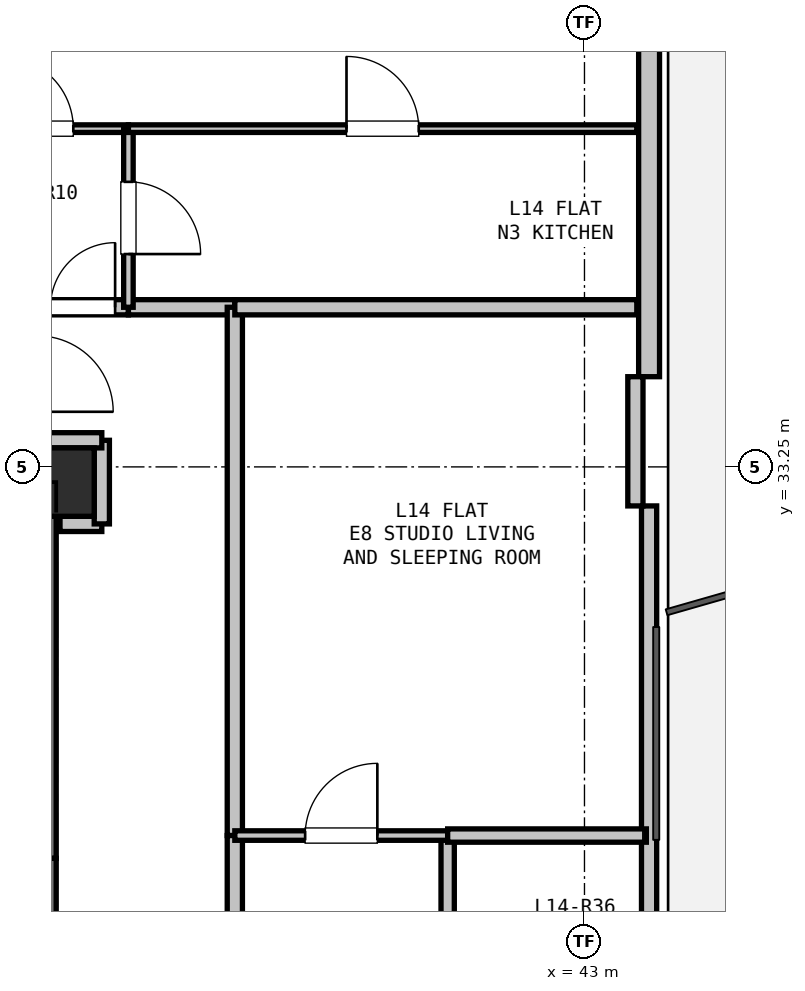
"""IFC4 building model, lengths in metres.
Left out: names, types, materials, properties, quantities, classifications, styles, units other than length and angle.
Written with IfcOpenShell. Run it as: python <this file> out.ifc"""

import sys

from ifc_helpers import new_model, si_unit, direction, frame, frame_2d, origin, origin_2d, place, context, subcontext, project, spatial, rectangle, extrude, element, fill, save


model = new_model("IFC4")
c1 = context("Model", 3, precision=1e-05, world=origin(), true_north=direction((0.0, 1.0)))
c2 = subcontext(c1, "Body", "Model", "MODEL_VIEW")
j1 = project(units=[si_unit("LENGTHUNIT", "METRE"), si_unit("PLANEANGLEUNIT", "RADIAN")], contexts=[c1])
p1 = place(None, origin())
s1 = spatial("IfcSite", under=j1, at=p1, CompositionType="ELEMENT")
p2 = place(p1, origin())
s2 = spatial("IfcBuilding", under=s1, at=p2, CompositionType="ELEMENT")
p3 = place(p2, frame((0.0, 0.0, 52.2)))
s3 = spatial("IfcBuildingStorey", under=s2, at=p3, CompositionType="ELEMENT", Elevation=52.2)
p4 = place(p3, frame((36.1, 33.05, 0.0), z_axis=(0.0, 0.0, 1.0), x_axis=(1.0, 0.0, 0.0)))
e1 = element("IfcColumn", 1, at=p4, inside=s3, PredefinedType="COLUMN", context=c2, shape_type="SweptSolid", body=[
    extrude(rectangle(XDim=0.9, YDim=0.9, at=origin_2d()), origin(), (0.0, 0.0, 1.0), 3.3),
])
p5 = place(p3, frame((43.85, 47.11, 0.0), z_axis=(0.0, 0.0, 1.0), x_axis=(0.0, -1.0, 0.0)))
e2 = element("IfcWall", 2, at=p5, inside=s3, PredefinedType="SOLIDWALL", context=c2, shape_type="SweptSolid", body=[
    extrude(rectangle(XDim=12.673, YDim=0.275, at=frame_2d((6.336, 0.0))), origin(), (0.0, 0.0, 1.0), 2.66),
])
p6 = place(p5, frame((2.325, 0.0, 0.0)))
e3 = element("IfcOpeningElement", 3, at=p6, cuts=e2, PredefinedType="OPENING", context=c2, shape_type="SweptSolid", body=[
    extrude(rectangle(XDim=1.0, YDim=2.1, at=frame_2d((0.5, 1.05))), frame((0.0, 0.147, 0.0), z_axis=(0.0, -1.0, 0.0), x_axis=(1.0, 0.0, 0.0)), (0.0, 0.0, 1.0), 0.295),
])
p7 = place(p3, frame((43.85, 32.737, 0.0), z_axis=(0.0, 0.0, 1.0), x_axis=(0.0, -1.0, 0.0)))
e4 = element("IfcWall", 4, at=p7, inside=s3, PredefinedType="PARAPET", context=c2, shape_type="SweptSolid", body=[
    extrude(rectangle(XDim=11.973, YDim=0.2, at=frame_2d((5.987, 0.0))), origin(), (0.0, 0.0, 1.0), 0.2),
])
p8 = place(p3, frame((43.67, 34.437, 0.0), z_axis=(0.0, 0.0, 1.0), x_axis=(0.0, -1.0, 0.0)))
e5 = element("IfcWall", 5, at=p8, inside=s3, PredefinedType="PARAPET", context=c2, shape_type="SweptSolid", body=[
    extrude(rectangle(XDim=1.7, YDim=0.2, at=frame_2d((0.85, 0.0))), origin(), (0.0, 0.0, 1.0), 2.66),
])
p9 = place(p3, frame((35.8, 32.75, 0.0), z_axis=(0.0, 0.0, 1.0), x_axis=(0.0, -1.0, 0.0)))
e6 = element("IfcWall", 6, at=p9, inside=s3, PredefinedType="SHEAR", context=c2, shape_type="SweptSolid", body=[
    extrude(rectangle(XDim=4.65, YDim=0.5, at=frame_2d((2.325, 0.0))), origin(), (0.0, 0.0, 1.0), 3.04),
])
p10 = place(p3, frame((35.8, 28.1, 0.0), z_axis=(0.0, 0.0, 1.0), x_axis=(0.0, -1.0, 0.0)))
e7 = element("IfcWall", 7, at=p10, inside=s3, PredefinedType="SHEAR", context=c2, shape_type="SweptSolid", body=[
    extrude(rectangle(XDim=7.35, YDim=0.5, at=frame_2d((3.675, 0.0))), origin(), (0.0, 0.0, 1.0), 3.04),
])
p11 = place(p3, frame((36.1, 32.5, 0.0), z_axis=(0.0, 0.0, 1.0), x_axis=(1.0, 0.0, 0.0)))
e8 = element("IfcWall", 8, at=p11, inside=s3, PredefinedType="PARTITIONING", context=c2, shape_type="SweptSolid", body=[
    extrude(rectangle(XDim=0.55, YDim=0.2, at=frame_2d((0.275, 0.0))), origin(), (0.0, 0.0, 1.0), 2.488),
])
p12 = place(p3, frame((36.65, 32.5, 0.0), z_axis=(0.0, 0.0, 1.0), x_axis=(0.0, 1.0, 0.0)))
e9 = element("IfcWall", 9, at=p12, inside=s3, PredefinedType="PARTITIONING", context=c2, shape_type="SweptSolid", body=[
    extrude(rectangle(XDim=1.1, YDim=0.2, at=frame_2d((0.55, 0.0))), origin(), (0.0, 0.0, 1.0), 2.338),
])
p13 = place(p3, frame((36.65, 33.6, 0.0), z_axis=(0.0, 0.0, 1.0), x_axis=(-1.0, 0.0, 0.0)))
e10 = element("IfcWall", 10, at=p13, inside=s3, PredefinedType="PARTITIONING", context=c2, shape_type="SweptSolid", body=[
    extrude(rectangle(XDim=0.85, YDim=0.2, at=frame_2d((0.425, 0.0))), origin(), (0.0, 0.0, 1.0), 2.338),
])
p14 = place(p3, frame((35.8, 35.35, 0.0), z_axis=(0.0, 0.0, 1.0), x_axis=(1.0, 0.0, 0.0)))
e11 = element("IfcWall", 11, at=p14, inside=s3, PredefinedType="PARTITIONING", context=c2, shape_type="SweptSolid", body=[
    extrude(rectangle(XDim=1.2, YDim=0.2, at=frame_2d((0.6, 0.0))), origin(), (0.0, 0.0, 1.0), 2.338),
])
p15 = place(p14, frame((0.175, 0.0, 0.0)))
e12 = element("IfcOpeningElement", 12, at=p15, cuts=e11, PredefinedType="OPENING", context=c2, shape_type="SweptSolid", body=[
    extrude(rectangle(XDim=0.85, YDim=2.1, at=frame_2d((0.425, 1.05))), frame((0.0, 0.11, 0.0), z_axis=(0.0, -1.0, 0.0), x_axis=(1.0, 0.0, 0.0)), (0.0, 0.0, 1.0), 0.22),
])
p16 = place(p3, frame((37.0, 35.35, 0.0), z_axis=(0.0, 0.0, 1.0), x_axis=(1.0, 0.0, 0.0)))
e13 = element("IfcWall", 13, at=p16, inside=s3, PredefinedType="PARTITIONING", context=c2, shape_type="SweptSolid", body=[
    extrude(rectangle(XDim=1.4, YDim=0.2, at=frame_2d((0.7, 0.0))), origin(), (0.0, 0.0, 1.0), 2.338),
])
p17 = place(p3, frame((38.4, 35.35, 0.0), z_axis=(0.0, 0.0, 1.0), x_axis=(0.0, -1.0, 0.0)))
e14 = element("IfcWall", 14, at=p17, inside=s3, PredefinedType="PARTITIONING", context=c2, shape_type="SweptSolid", body=[
    extrude(rectangle(XDim=6.95, YDim=0.2, at=frame_2d((3.475, 0.0))), origin(), (0.0, 0.0, 1.0), 2.338),
])
p18 = place(p3, frame((38.4, 28.4, 0.0), z_axis=(0.0, 0.0, 1.0), x_axis=(0.0, -1.0, 0.0)))
e15 = element("IfcWall", 15, at=p18, inside=s3, PredefinedType="PARTITIONING", context=c2, shape_type="SweptSolid", body=[
    extrude(rectangle(XDim=3.2, YDim=0.2, at=frame_2d((1.6, 0.0))), origin(), (0.0, 0.0, 1.0), 3.04),
])
p19 = place(p18, frame((1.1, 0.0, 0.0)))
e16 = element("IfcOpeningElement", 16, at=p19, cuts=e15, PredefinedType="OPENING", context=c2, shape_type="SweptSolid", body=[
    extrude(rectangle(XDim=1.0, YDim=2.15, at=frame_2d((0.5, 1.075))), frame((0.0, 0.11, 0.0), z_axis=(0.0, -1.0, 0.0), x_axis=(1.0, 0.0, 0.0)), (0.0, 0.0, 1.0), 0.22),
])
p20 = place(p3, frame((34.6, 37.7, 0.0), z_axis=(0.0, 0.0, 1.0), x_axis=(1.0, 0.0, 0.0)))
e17 = element("IfcWall", 17, at=p20, inside=s3, PredefinedType="PARTITIONING", context=c2, shape_type="SweptSolid", body=[
    extrude(rectangle(XDim=2.4, YDim=0.1, at=frame_2d((1.2, 0.0))), origin(), (0.0, 0.0, 1.0), 2.338),
])
p21 = place(p20, frame((0.725, 0.0, 0.0)))
e18 = element("IfcOpeningElement", 18, at=p21, cuts=e17, PredefinedType="OPENING", context=c2, shape_type="SweptSolid", body=[
    extrude(rectangle(XDim=0.95, YDim=2.1, at=frame_2d((0.475, 1.05))), frame((0.0, 0.06, 0.0), z_axis=(0.0, -1.0, 0.0), x_axis=(1.0, 0.0, 0.0)), (0.0, 0.0, 1.0), 0.12),
])
p22 = place(p3, frame((37.0, 37.7, 0.0), z_axis=(0.0, 0.0, 1.0), x_axis=(0.0, -1.0, 0.0)))
e19 = element("IfcWall", 19, at=p22, inside=s3, PredefinedType="PARTITIONING", context=c2, shape_type="SweptSolid", body=[
    extrude(rectangle(XDim=2.35, YDim=0.125, at=frame_2d((1.175, 0.0))), origin(), (0.0, 0.0, 1.0), 2.338),
])
p23 = place(p22, frame((0.7, 0.0, 0.0)))
e20 = element("IfcOpeningElement", 20, at=p23, cuts=e19, PredefinedType="OPENING", context=c2, shape_type="SweptSolid", body=[
    extrude(rectangle(XDim=0.95, YDim=2.1, at=frame_2d((0.475, 1.05))), frame((0.0, 0.073, 0.0), z_axis=(0.0, -1.0, 0.0), x_axis=(1.0, 0.0, 0.0)), (0.0, 0.0, 1.0), 0.145),
])
p24 = place(p3, frame((41.2, 28.4, 0.0), z_axis=(0.0, 0.0, 1.0), x_axis=(0.0, -1.0, 0.0)))
e21 = element("IfcWall", 21, at=p24, inside=s3, PredefinedType="PLUMBINGWALL", context=c2, shape_type="SweptSolid", body=[
    extrude(rectangle(XDim=3.2, YDim=0.175, at=frame_2d((1.6, 0.0))), origin(), (0.0, 0.0, 1.0), 3.04),
])
p25 = place(p24, frame((1.15, 0.0, 0.0)))
e22 = element("IfcOpeningElement", 22, at=p25, cuts=e21, PredefinedType="OPENING", context=c2, shape_type="SweptSolid", body=[
    extrude(rectangle(XDim=0.9, YDim=2.1, at=frame_2d((0.45, 1.05))), frame((0.0, 0.097, 0.0), z_axis=(0.0, -1.0, 0.0), x_axis=(1.0, 0.0, 0.0)), (0.0, 0.0, 1.0), 0.195),
])
p26 = place(p3, frame((38.4, 28.4, 0.0), z_axis=(0.0, 0.0, 1.0), x_axis=(1.0, 0.0, 0.0)))
e23 = element("IfcWall", 23, at=p26, inside=s3, PredefinedType="PARTITIONING", context=c2, shape_type="SweptSolid", body=[
    extrude(rectangle(XDim=2.8, YDim=0.125, at=frame_2d((1.4, 0.0))), origin(), (0.0, 0.0, 1.0), 3.04),
])
p27 = place(p26, frame((0.925, 0.0, 0.0)))
e24 = element("IfcOpeningElement", 24, at=p27, cuts=e23, PredefinedType="OPENING", context=c2, shape_type="SweptSolid", body=[
    extrude(rectangle(XDim=0.95, YDim=2.1, at=frame_2d((0.475, 1.05))), frame((0.0, 0.073, 0.0), z_axis=(0.0, -1.0, 0.0), x_axis=(1.0, 0.0, 0.0)), (0.0, 0.0, 1.0), 0.145),
])
p28 = place(p3, frame((43.688, 35.35, 0.0), z_axis=(0.0, 0.0, 1.0), x_axis=(-1.0, 0.0, 0.0)))
e25 = element("IfcWall", 25, at=p28, inside=s3, PredefinedType="PARTITIONING", context=c2, shape_type="SweptSolid", body=[
    extrude(rectangle(XDim=5.289, YDim=0.2, at=frame_2d((2.644, 0.0))), origin(), (0.0, 0.0, 1.0), 2.338),
])
p29 = place(p3, frame((37.0, 37.7, 0.0), z_axis=(0.0, 0.0, 1.0), x_axis=(1.0, 0.0, 0.0)))
e26 = element("IfcWall", 26, at=p29, inside=s3, PredefinedType="PARTITIONING", context=c2, shape_type="SweptSolid", body=[
    extrude(rectangle(XDim=6.688, YDim=0.1, at=frame_2d((3.344, 0.0))), origin(), (0.0, 0.0, 1.0), 2.338),
])
p30 = place(p29, frame((2.869, 0.0, 0.0)))
e27 = element("IfcOpeningElement", 27, at=p30, cuts=e26, PredefinedType="OPENING", context=c2, shape_type="SweptSolid", body=[
    extrude(rectangle(XDim=0.95, YDim=2.1, at=frame_2d((0.475, 1.05))), frame((0.0, 0.06, 0.0), z_axis=(0.0, -1.0, 0.0), x_axis=(1.0, 0.0, 0.0)), (0.0, 0.0, 1.0), 0.12),
])
p31 = place(p3, frame((41.2, 28.4, 0.0), z_axis=(0.0, 0.0, 1.0), x_axis=(1.0, 0.0, 0.0)))
e28 = element("IfcWall", 28, at=p31, inside=s3, PredefinedType="PLUMBINGWALL", context=c2, shape_type="SweptSolid", body=[
    extrude(rectangle(XDim=2.614, YDim=0.175, at=frame_2d((1.307, 0.0))), origin(), (0.0, 0.0, 1.0), 2.365),
])
p32 = place(p15, origin())
e29 = element("IfcDoor", 29, at=p32, inside=s3, OperationType="SINGLE_SWING_RIGHT", PredefinedType="DOOR", context=c2, shape_type="SweptSolid", body=[
    extrude(rectangle(XDim=0.85, YDim=2.1, at=frame_2d((0.425, 1.05))), frame((0.0, 0.025, 0.0), z_axis=(0.0, -1.0, 0.0), x_axis=(1.0, 0.0, 0.0)), (0.0, 0.0, 1.0), 0.05),
])
fill(e12, e29)
p33 = place(p23, origin())
e30 = element("IfcDoor", 30, at=p33, inside=s3, OperationType="SINGLE_SWING_RIGHT", PredefinedType="DOOR", context=c2, shape_type="SweptSolid", body=[
    extrude(rectangle(XDim=0.95, YDim=2.1, at=frame_2d((0.475, 1.05))), frame((0.0, 0.025, 0.0), z_axis=(0.0, -1.0, 0.0), x_axis=(1.0, 0.0, 0.0)), (0.0, 0.0, 1.0), 0.05),
])
fill(e20, e30)
p34 = place(p21, origin())
e31 = element("IfcDoor", 31, at=p34, inside=s3, OperationType="SINGLE_SWING_LEFT", PredefinedType="DOOR", context=c2, shape_type="SweptSolid", body=[
    extrude(rectangle(XDim=0.95, YDim=2.1, at=frame_2d((0.475, 1.05))), frame((0.0, 0.025, 0.0), z_axis=(0.0, -1.0, 0.0), x_axis=(1.0, 0.0, 0.0)), (0.0, 0.0, 1.0), 0.05),
])
fill(e18, e31)
p35 = place(p27, origin())
e32 = element("IfcDoor", 32, at=p35, inside=s3, OperationType="SINGLE_SWING_RIGHT", PredefinedType="DOOR", context=c2, shape_type="SweptSolid", body=[
    extrude(rectangle(XDim=0.95, YDim=2.1, at=frame_2d((0.475, 1.05))), frame((0.0, 0.025, 0.0), z_axis=(0.0, -1.0, 0.0), x_axis=(1.0, 0.0, 0.0)), (0.0, 0.0, 1.0), 0.05),
])
fill(e24, e32)
p36 = place(p30, origin())
e33 = element("IfcDoor", 33, at=p36, inside=s3, OperationType="SINGLE_SWING_LEFT", PredefinedType="DOOR", context=c2, shape_type="SweptSolid", body=[
    extrude(rectangle(XDim=0.95, YDim=2.1, at=frame_2d((0.475, 1.05))), frame((0.0, 0.025, 0.0), z_axis=(0.0, -1.0, 0.0), x_axis=(1.0, 0.0, 0.0)), (0.0, 0.0, 1.0), 0.05),
])
fill(e27, e33)
save(model, sys.argv[1])
